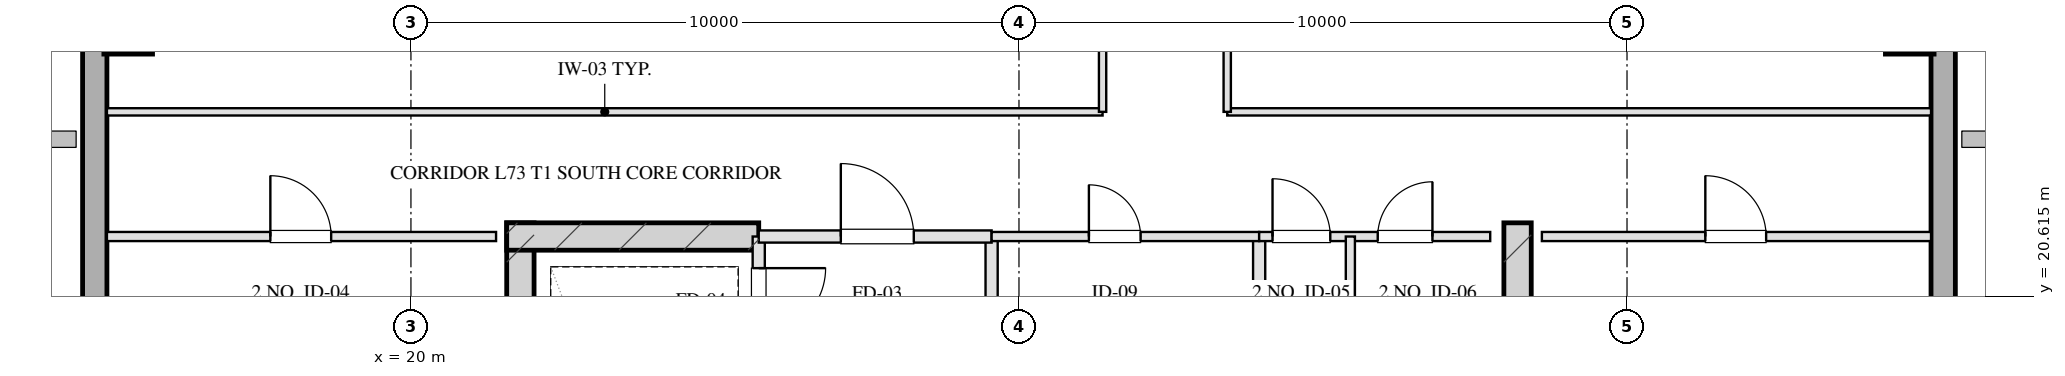
"""IFC4 building model, lengths in metres.
Left out: names, types, materials, properties, quantities, classifications, styles, units other than length and angle.
Written with IfcOpenShell. Run it as: python <this file> out.ifc"""

import sys

from ifc_helpers import new_model, si_unit, direction, frame, frame_2d, origin, origin_2d, place, context, subcontext, project, spatial, rectangle, hollow_rectangle, extrude, element, fill, save


model = new_model("IFC4")
c1 = context("Model", 3, precision=1e-05, world=origin(), true_north=direction((0.0, 1.0)))
c2 = subcontext(c1, "Body", "Model", "MODEL_VIEW")
j1 = project(units=[si_unit("LENGTHUNIT", "METRE"), si_unit("PLANEANGLEUNIT", "RADIAN")], contexts=[c1])
p1 = place(None, origin())
s1 = spatial("IfcSite", under=j1, at=p1, CompositionType="ELEMENT")
p2 = place(p1, origin())
s2 = spatial("IfcBuilding", under=s1, at=p2, CompositionType="ELEMENT")
p3 = place(p2, frame((0.0, 0.0, 266.4)))
s3 = spatial("IfcBuildingStorey", under=s2, at=p3, CompositionType="ELEMENT", Elevation=266.4)
for number, where, z_axis, x_axis in (
    (1, (21.8, 21.825, 0.0), (0.0, 0.0, 1.0), (0.0, -1.0, 0.0)),
    (2, (38.2, 21.825, 0.0), (0.0, 0.0, 1.0), (0.0, -1.0, 0.0)),
):
    element("IfcWall", number, at=place(p3, frame(where, z_axis=z_axis, x_axis=x_axis)), inside=s3, PredefinedType="SHEAR", context=c2, shape_type="SweptSolid", body=[
        extrude(rectangle(XDim=9.33, YDim=0.45, at=frame_2d((4.665, 0.0))), origin(), (0.0, 0.0, 1.0), 3.2),
    ])
p4 = place(p3, frame((21.575, 21.6, 0.0), z_axis=(0.0, 0.0, 1.0), x_axis=(1.0, 0.0, 0.0)))
e3 = element("IfcWall", 3, at=p4, inside=s3, PredefinedType="SHEAR", context=c2, shape_type="SweptSolid", body=[
    extrude(rectangle(XDim=4.145, YDim=0.45, at=frame_2d((2.073, 0.0))), origin(), (0.0, 0.0, 1.0), 3.2),
])
for number, where, z_axis, x_axis in (
    (4, (15.35, 25.0, 0.0), (0.0, 0.0, 1.0), (1.0, 0.0, 0.0)),
    (5, (44.65, 25.0, 0.0), (0.0, 0.0, 1.0), (1.0, 0.0, 0.0)),
):
    element("IfcColumn", number, at=place(p3, frame(where, z_axis=z_axis, x_axis=x_axis)), inside=s3, PredefinedType="COLUMN", context=c2, shape_type="SweptSolid", body=[
        extrude(hollow_rectangle(XDim=0.8, YDim=0.8, WallThickness=0.028, at=origin_2d()), origin(), (0.0, 0.0, 1.0), 3.201),
    ])
p5 = place(p3, frame((14.8, 13.1, 0.0), z_axis=(0.0, 0.0, 1.0), x_axis=(0.0, 1.0, 0.0)))
e6 = element("IfcWall", 6, at=p5, inside=s3, PredefinedType="SOLIDWALL", context=c2, shape_type="SweptSolid", body=[
    extrude(rectangle(XDim=41.8, YDim=0.4, at=frame_2d((20.9, 0.0))), origin(), (0.0, 0.0, 1.0), 2.36),
])
p6 = place(p5, frame((13.525, 0.0, 0.75)))
e7 = element("IfcOpeningElement", 7, at=p6, cuts=e6, PredefinedType="OPENING", context=c2, shape_type="SweptSolid", body=[
    extrude(rectangle(XDim=1.95, YDim=1.21, at=frame_2d((0.975, 0.605))), frame((0.0, 0.21, 0.0), z_axis=(0.0, -1.0, 0.0), x_axis=(1.0, 0.0, 0.0)), (0.0, 0.0, 1.0), 0.42),
])
p7 = place(p5, frame((17.325, 0.0, 0.75)))
e8 = element("IfcOpeningElement", 8, at=p7, cuts=e6, PredefinedType="OPENING", context=c2, shape_type="SweptSolid", body=[
    extrude(rectangle(XDim=1.95, YDim=1.21, at=frame_2d((0.975, 0.605))), frame((0.0, 0.21, 0.0), z_axis=(0.0, -1.0, 0.0), x_axis=(1.0, 0.0, 0.0)), (0.0, 0.0, 1.0), 0.42),
])
p8 = place(p5, frame((26.15, 0.0, 0.0)))
e9 = element("IfcOpeningElement", 9, at=p8, cuts=e6, PredefinedType="OPENING", context=c2, shape_type="SweptSolid", body=[
    extrude(rectangle(XDim=1.1, YDim=2.15, at=frame_2d((0.55, 1.075))), frame((0.0, 0.21, 0.0), z_axis=(0.0, -1.0, 0.0), x_axis=(1.0, 0.0, 0.0)), (0.0, 0.0, 1.0), 0.42),
])
p9 = place(p3, frame((45.2, 54.9, 0.0), z_axis=(0.0, 0.0, 1.0), x_axis=(0.0, -1.0, 0.0)))
e10 = element("IfcWall", 10, at=p9, inside=s3, PredefinedType="SOLIDWALL", context=c2, shape_type="SweptSolid", body=[
    extrude(rectangle(XDim=41.8, YDim=0.4, at=frame_2d((20.9, 0.0))), origin(), (0.0, 0.0, 1.0), 2.36),
])
p10 = place(p9, frame((26.325, 0.0, 0.75)))
e11 = element("IfcOpeningElement", 11, at=p10, cuts=e10, PredefinedType="OPENING", context=c2, shape_type="SweptSolid", body=[
    extrude(rectangle(XDim=1.95, YDim=1.21, at=frame_2d((0.975, 0.605))), frame((0.0, 0.21, 0.0), z_axis=(0.0, -1.0, 0.0), x_axis=(1.0, 0.0, 0.0)), (0.0, 0.0, 1.0), 0.42),
])
p11 = place(p9, frame((22.525, 0.0, 0.75)))
e12 = element("IfcOpeningElement", 12, at=p11, cuts=e10, PredefinedType="OPENING", context=c2, shape_type="SweptSolid", body=[
    extrude(rectangle(XDim=1.95, YDim=1.21, at=frame_2d((0.975, 0.605))), frame((0.0, 0.21, 0.0), z_axis=(0.0, -1.0, 0.0), x_axis=(1.0, 0.0, 0.0)), (0.0, 0.0, 1.0), 0.42),
])
p12 = place(p9, frame((14.55, 0.0, 0.0)))
e13 = element("IfcOpeningElement", 13, at=p12, cuts=e10, PredefinedType="OPENING", context=c2, shape_type="SweptSolid", body=[
    extrude(rectangle(XDim=1.1, YDim=2.15, at=frame_2d((0.55, 1.075))), frame((0.0, 0.21, 0.0), z_axis=(0.0, -1.0, 0.0), x_axis=(1.0, 0.0, 0.0)), (0.0, 0.0, 1.0), 0.42),
])
p13 = place(p3, frame((25.72, 21.6, 0.0), z_axis=(0.0, 0.0, 1.0), x_axis=(0.0, -1.0, 0.0)))
e14 = element("IfcWall", 14, at=p13, inside=s3, PredefinedType="PARTITIONING", context=c2, shape_type="SweptSolid", body=[
    extrude(rectangle(XDim=1.9, YDim=0.2, at=frame_2d((0.95, 0.0))), origin(), (0.0, 0.0, 1.0), 2.925),
])
p14 = place(p13, frame((0.52, 0.0, 0.0)))
e15 = element("IfcOpeningElement", 15, at=p14, cuts=e14, PredefinedType="OPENING", context=c2, shape_type="SweptSolid", body=[
    extrude(rectangle(XDim=1.1, YDim=2.05, at=frame_2d((0.55, 1.025))), frame((0.0, 0.11, 0.0), z_axis=(0.0, -1.0, 0.0), x_axis=(1.0, 0.0, 0.0)), (0.0, 0.0, 1.0), 0.22),
])
p15 = place(p3, frame((29.55, 21.6, 0.0), z_axis=(0.0, 0.0, 1.0), x_axis=(0.0, -1.0, 0.0)))
e16 = element("IfcWall", 16, at=p15, inside=s3, PredefinedType="PARTITIONING", context=c2, shape_type="SweptSolid", body=[
    extrude(rectangle(XDim=8.43, YDim=0.2, at=frame_2d((4.215, 0.0))), origin(), (0.0, 0.0, 1.0), 2.925),
])
p16 = place(p3, frame((25.72, 21.6, 0.0), z_axis=(0.0, 0.0, 1.0), x_axis=(1.0, 0.0, 0.0)))
e17 = element("IfcWall", 17, at=p16, inside=s3, PredefinedType="PARTITIONING", context=c2, shape_type="SweptSolid", body=[
    extrude(rectangle(XDim=3.83, YDim=0.2, at=frame_2d((1.915, 0.0))), origin(), (0.0, 0.0, 1.0), 2.925),
])
p17 = place(p16, frame((1.35, 0.0, 0.0)))
e18 = element("IfcOpeningElement", 18, at=p17, cuts=e17, PredefinedType="OPENING", context=c2, shape_type="SweptSolid", body=[
    extrude(rectangle(XDim=1.2, YDim=2.05, at=frame_2d((0.6, 1.025))), frame((0.0, 0.11, 0.0), z_axis=(0.0, -1.0, 0.0), x_axis=(1.0, 0.0, 0.0)), (0.0, 0.0, 1.0), 0.22),
])
p18 = place(p3, frame((33.95, 21.6, 0.0), z_axis=(0.0, 0.0, 1.0), x_axis=(0.0, -1.0, 0.0)))
e19 = element("IfcWall", 19, at=p18, inside=s3, PredefinedType="PARTITIONING", context=c2, shape_type="SweptSolid", body=[
    extrude(rectangle(XDim=8.43, YDim=0.2, at=frame_2d((4.215, 0.0))), origin(), (0.0, 0.0, 1.0), 2.925),
])
p19 = place(p3, frame((29.55, 21.6, 0.0), z_axis=(0.0, 0.0, 1.0), x_axis=(1.0, 0.0, 0.0)))
e20 = element("IfcWall", 20, at=p19, inside=s3, PredefinedType="PARTITIONING", context=c2, shape_type="SweptSolid", body=[
    extrude(rectangle(XDim=4.4, YDim=0.15, at=frame_2d((2.2, 0.0))), origin(), (0.0, 0.0, 1.0), 2.925),
])
p20 = place(p19, frame((1.6, 0.0, 0.0)))
e21 = element("IfcOpeningElement", 21, at=p20, cuts=e20, PredefinedType="OPENING", context=c2, shape_type="SweptSolid", body=[
    extrude(rectangle(XDim=0.85, YDim=2.05, at=frame_2d((0.425, 1.025))), frame((0.0, 0.085, 0.0), z_axis=(0.0, -1.0, 0.0), x_axis=(1.0, 0.0, 0.0)), (0.0, 0.0, 1.0), 0.17),
])
p21 = place(p3, frame((33.95, 21.6, 0.0), z_axis=(0.0, 0.0, 1.0), x_axis=(1.0, 0.0, 0.0)))
e22 = element("IfcWall", 22, at=p21, inside=s3, PredefinedType="PARTITIONING", context=c2, shape_type="SweptSolid", body=[
    extrude(rectangle(XDim=3.8, YDim=0.15, at=frame_2d((1.9, 0.0))), origin(), (0.0, 0.0, 1.0), 2.925),
])
p22 = place(p21, frame((0.22, 0.0, 0.0)))
e23 = element("IfcOpeningElement", 23, at=p22, cuts=e22, PredefinedType="OPENING", context=c2, shape_type="SweptSolid", body=[
    extrude(rectangle(XDim=0.95, YDim=2.05, at=frame_2d((0.475, 1.025))), frame((0.0, 0.085, 0.0), z_axis=(0.0, -1.0, 0.0), x_axis=(1.0, 0.0, 0.0)), (0.0, 0.0, 1.0), 0.17),
])
p23 = place(p21, frame((1.95, 0.0, 0.0)))
e24 = element("IfcOpeningElement", 24, at=p23, cuts=e22, PredefinedType="OPENING", context=c2, shape_type="SweptSolid", body=[
    extrude(rectangle(XDim=0.9, YDim=2.05, at=frame_2d((0.45, 1.025))), frame((0.0, 0.085, 0.0), z_axis=(0.0, -1.0, 0.0), x_axis=(1.0, 0.0, 0.0)), (0.0, 0.0, 1.0), 0.17),
])
p24 = place(p3, frame((35.45, 21.6, 0.0), z_axis=(0.0, 0.0, 1.0), x_axis=(0.0, -1.0, 0.0)))
e25 = element("IfcWall", 25, at=p24, inside=s3, PredefinedType="PARTITIONING", context=c2, shape_type="SweptSolid", body=[
    extrude(rectangle(XDim=8.43, YDim=0.15, at=frame_2d((4.215, 0.0))), origin(), (0.0, 0.0, 1.0), 2.565),
])
p25 = place(p24, frame((2.55, 0.0, 0.0)))
e26 = element("IfcOpeningElement", 26, at=p25, cuts=e25, PredefinedType="OPENING", context=c2, shape_type="SweptSolid", body=[
    extrude(rectangle(XDim=0.95, YDim=2.05, at=frame_2d((0.475, 1.025))), frame((0.0, 0.085, 0.0), z_axis=(0.0, -1.0, 0.0), x_axis=(1.0, 0.0, 0.0)), (0.0, 0.0, 1.0), 0.17),
])
p26 = place(p24, frame((5.6, 0.0, 0.0)))
e27 = element("IfcOpeningElement", 27, at=p26, cuts=e25, PredefinedType="OPENING", context=c2, shape_type="SweptSolid", body=[
    extrude(rectangle(XDim=0.9, YDim=2.05, at=frame_2d((0.45, 1.025))), frame((0.0, 0.085, 0.0), z_axis=(0.0, -1.0, 0.0), x_axis=(1.0, 0.0, 0.0)), (0.0, 0.0, 1.0), 0.17),
])
p27 = place(p3, frame((15.0, 21.6, 0.0), z_axis=(0.0, 0.0, 1.0), x_axis=(1.0, 0.0, 0.0)))
e28 = element("IfcWall", 28, at=p27, inside=s3, PredefinedType="PARTITIONING", context=c2, shape_type="SweptSolid", body=[
    extrude(rectangle(XDim=6.4, YDim=0.15, at=frame_2d((3.2, 0.0))), origin(), (0.0, 0.0, 1.0), 2.925),
])
p28 = place(p27, frame((2.688, 0.0, 0.0)))
e29 = element("IfcOpeningElement", 29, at=p28, cuts=e28, PredefinedType="OPENING", context=c2, shape_type="SweptSolid", body=[
    extrude(rectangle(XDim=1.0, YDim=2.05, at=frame_2d((0.5, 1.025))), frame((0.0, 0.085, 0.0), z_axis=(0.0, -1.0, 0.0), x_axis=(1.0, 0.0, 0.0)), (0.0, 0.0, 1.0), 0.17),
])
p29 = place(p3, frame((38.6, 21.6, 0.0), z_axis=(0.0, 0.0, 1.0), x_axis=(1.0, 0.0, 0.0)))
e30 = element("IfcWall", 30, at=p29, inside=s3, PredefinedType="PARTITIONING", context=c2, shape_type="SweptSolid", body=[
    extrude(rectangle(XDim=6.4, YDim=0.15, at=frame_2d((3.2, 0.0))), origin(), (0.0, 0.0, 1.0), 2.925),
])
p30 = place(p29, frame((2.688, 0.0, 0.0)))
e31 = element("IfcOpeningElement", 31, at=p30, cuts=e30, PredefinedType="OPENING", context=c2, shape_type="SweptSolid", body=[
    extrude(rectangle(XDim=1.0, YDim=2.05, at=frame_2d((0.5, 1.025))), frame((0.0, 0.085, 0.0), z_axis=(0.0, -1.0, 0.0), x_axis=(1.0, 0.0, 0.0)), (0.0, 0.0, 1.0), 0.17),
])
p31 = place(p3, frame((15.0, 23.65, 0.0), z_axis=(0.0, 0.0, 1.0), x_axis=(1.0, 0.0, 0.0)))
e32 = element("IfcWall", 32, at=p31, inside=s3, PredefinedType="PARTITIONING", context=c2, shape_type="SweptSolid", body=[
    extrude(rectangle(XDim=16.375, YDim=0.12, at=frame_2d((8.188, 0.0))), origin(), (0.0, 0.0, 1.0), 2.925),
])
p32 = place(p3, frame((33.425, 23.65, 0.0), z_axis=(0.0, 0.0, 1.0), x_axis=(1.0, 0.0, 0.0)))
e33 = element("IfcWall", 33, at=p32, inside=s3, PredefinedType="PARTITIONING", context=c2, shape_type="SweptSolid", body=[
    extrude(rectangle(XDim=11.575, YDim=0.12, at=frame_2d((5.788, 0.0))), origin(), (0.0, 0.0, 1.0), 2.925),
])
p33 = place(p3, frame((31.375, 23.65, 0.0), z_axis=(0.0, 0.0, 1.0), x_axis=(0.0, 1.0, 0.0)))
e34 = element("IfcWall", 34, at=p33, inside=s3, PredefinedType="PARTITIONING", context=c2, shape_type="SweptSolid", body=[
    extrude(rectangle(XDim=20.7, YDim=0.12, at=frame_2d((10.35, 0.0))), origin(), (0.0, 0.0, 1.0), 2.925),
])
p34 = place(p33, frame((2.675, 0.0, 0.0)))
e35 = element("IfcOpeningElement", 35, at=p34, cuts=e34, PredefinedType="OPENING", context=c2, shape_type="SweptSolid", body=[
    extrude(rectangle(XDim=1.0, YDim=2.05, at=frame_2d((0.5, 1.025))), frame((0.0, 0.07, 0.0), z_axis=(0.0, -1.0, 0.0), x_axis=(1.0, 0.0, 0.0)), (0.0, 0.0, 1.0), 0.14),
])
p35 = place(p33, frame((9.85, 0.0, 0.0)))
e36 = element("IfcOpeningElement", 36, at=p35, cuts=e34, PredefinedType="OPENING", context=c2, shape_type="SweptSolid", body=[
    extrude(rectangle(XDim=1.0, YDim=2.05, at=frame_2d((0.5, 1.025))), frame((0.0, 0.07, 0.0), z_axis=(0.0, -1.0, 0.0), x_axis=(1.0, 0.0, 0.0)), (0.0, 0.0, 1.0), 0.14),
])
p36 = place(p33, frame((17.025, 0.0, 0.0)))
e37 = element("IfcOpeningElement", 37, at=p36, cuts=e34, PredefinedType="OPENING", context=c2, shape_type="SweptSolid", body=[
    extrude(rectangle(XDim=1.0, YDim=2.05, at=frame_2d((0.5, 1.025))), frame((0.0, 0.07, 0.0), z_axis=(0.0, -1.0, 0.0), x_axis=(1.0, 0.0, 0.0)), (0.0, 0.0, 1.0), 0.14),
])
p37 = place(p3, frame((33.425, 23.65, 0.0), z_axis=(0.0, 0.0, 1.0), x_axis=(0.0, 1.0, 0.0)))
e38 = element("IfcWall", 38, at=p37, inside=s3, PredefinedType="PARTITIONING", context=c2, shape_type="SweptSolid", body=[
    extrude(rectangle(XDim=20.7, YDim=0.12, at=frame_2d((10.35, 0.0))), origin(), (0.0, 0.0, 1.0), 2.925),
])
p38 = place(p37, frame((2.175, 0.0, 0.0)))
e39 = element("IfcOpeningElement", 39, at=p38, cuts=e38, PredefinedType="OPENING", context=c2, shape_type="SweptSolid", body=[
    extrude(rectangle(XDim=1.0, YDim=2.05, at=frame_2d((0.5, 1.025))), frame((0.0, 0.07, 0.0), z_axis=(0.0, -1.0, 0.0), x_axis=(1.0, 0.0, 0.0)), (0.0, 0.0, 1.0), 0.14),
])
p39 = place(p37, frame((6.75, 0.0, 0.0)))
e40 = element("IfcOpeningElement", 40, at=p39, cuts=e38, PredefinedType="OPENING", context=c2, shape_type="SweptSolid", body=[
    extrude(rectangle(XDim=0.85, YDim=2.05, at=frame_2d((0.425, 1.025))), frame((0.0, 0.07, 0.0), z_axis=(0.0, -1.0, 0.0), x_axis=(1.0, 0.0, 0.0)), (0.0, 0.0, 1.0), 0.14),
])
p40 = place(p37, frame((11.25, 0.0, 0.0)))
e41 = element("IfcOpeningElement", 41, at=p40, cuts=e38, PredefinedType="OPENING", context=c2, shape_type="SweptSolid", body=[
    extrude(rectangle(XDim=1.05, YDim=2.05, at=frame_2d((0.525, 1.025))), frame((0.0, 0.07, 0.0), z_axis=(0.0, -1.0, 0.0), x_axis=(1.0, 0.0, 0.0)), (0.0, 0.0, 1.0), 0.14),
])
p41 = place(p37, frame((15.75, 0.0, 0.0)))
e42 = element("IfcOpeningElement", 42, at=p41, cuts=e38, PredefinedType="OPENING", context=c2, shape_type="SweptSolid", body=[
    extrude(rectangle(XDim=1.0, YDim=2.05, at=frame_2d((0.5, 1.025))), frame((0.0, 0.07, 0.0), z_axis=(0.0, -1.0, 0.0), x_axis=(1.0, 0.0, 0.0)), (0.0, 0.0, 1.0), 0.14),
])
p42 = place(p37, frame((18.925, 0.0, 0.0)))
e43 = element("IfcOpeningElement", 43, at=p42, cuts=e38, PredefinedType="OPENING", context=c2, shape_type="SweptSolid", body=[
    extrude(rectangle(XDim=1.0, YDim=2.05, at=frame_2d((0.5, 1.025))), frame((0.0, 0.07, 0.0), z_axis=(0.0, -1.0, 0.0), x_axis=(1.0, 0.0, 0.0)), (0.0, 0.0, 1.0), 0.14),
])
p43 = place(p14, origin())
e44 = element("IfcDoor", 44, at=p43, inside=s3, OperationType="SINGLE_SWING_LEFT", PredefinedType="DOOR", context=c2, shape_type="SweptSolid", body=[
    extrude(rectangle(XDim=1.1, YDim=2.05, at=frame_2d((0.55, 1.025))), frame((0.0, 0.025, 0.0), z_axis=(0.0, -1.0, 0.0), x_axis=(1.0, 0.0, 0.0)), (0.0, 0.0, 1.0), 0.05),
])
fill(e15, e44)
p44 = place(p17, origin())
e45 = element("IfcDoor", 45, at=p44, inside=s3, OperationType="SINGLE_SWING_LEFT", PredefinedType="DOOR", context=c2, shape_type="SweptSolid", body=[
    extrude(rectangle(XDim=1.2, YDim=2.05, at=frame_2d((0.6, 1.025))), frame((0.0, 0.025, 0.0), z_axis=(0.0, -1.0, 0.0), x_axis=(1.0, 0.0, 0.0)), (0.0, 0.0, 1.0), 0.05),
])
fill(e18, e45)
p45 = place(p20, origin())
e46 = element("IfcDoor", 46, at=p45, inside=s3, OperationType="SINGLE_SWING_LEFT", PredefinedType="DOOR", context=c2, shape_type="SweptSolid", body=[
    extrude(rectangle(XDim=0.85, YDim=2.05, at=frame_2d((0.425, 1.025))), frame((0.0, 0.025, 0.0), z_axis=(0.0, -1.0, 0.0), x_axis=(1.0, 0.0, 0.0)), (0.0, 0.0, 1.0), 0.05),
])
fill(e21, e46)
p46 = place(p22, origin())
e47 = element("IfcDoor", 47, at=p46, inside=s3, OperationType="SINGLE_SWING_LEFT", PredefinedType="DOOR", context=c2, shape_type="SweptSolid", body=[
    extrude(rectangle(XDim=0.95, YDim=2.05, at=frame_2d((0.475, 1.025))), frame((0.0, 0.025, 0.0), z_axis=(0.0, -1.0, 0.0), x_axis=(1.0, 0.0, 0.0)), (0.0, 0.0, 1.0), 0.05),
])
fill(e23, e47)
p47 = place(p23, origin())
e48 = element("IfcDoor", 48, at=p47, inside=s3, OperationType="SINGLE_SWING_RIGHT", PredefinedType="DOOR", context=c2, shape_type="SweptSolid", body=[
    extrude(rectangle(XDim=0.9, YDim=2.05, at=frame_2d((0.45, 1.025))), frame((0.0, 0.025, 0.0), z_axis=(0.0, -1.0, 0.0), x_axis=(1.0, 0.0, 0.0)), (0.0, 0.0, 1.0), 0.05),
])
fill(e24, e48)
p48 = place(p28, origin())
e49 = element("IfcDoor", 49, at=p48, inside=s3, OperationType="SINGLE_SWING_LEFT", PredefinedType="DOOR", context=c2, shape_type="SweptSolid", body=[
    extrude(rectangle(XDim=1.0, YDim=2.05, at=frame_2d((0.5, 1.025))), frame((0.0, 0.025, 0.0), z_axis=(0.0, -1.0, 0.0), x_axis=(1.0, 0.0, 0.0)), (0.0, 0.0, 1.0), 0.05),
])
fill(e29, e49)
p49 = place(p30, origin())
e50 = element("IfcDoor", 50, at=p49, inside=s3, OperationType="SINGLE_SWING_LEFT", PredefinedType="DOOR", context=c2, shape_type="SweptSolid", body=[
    extrude(rectangle(XDim=1.0, YDim=2.05, at=frame_2d((0.5, 1.025))), frame((0.0, 0.025, 0.0), z_axis=(0.0, -1.0, 0.0), x_axis=(1.0, 0.0, 0.0)), (0.0, 0.0, 1.0), 0.05),
])
fill(e31, e50)
save(model, sys.argv[1])
